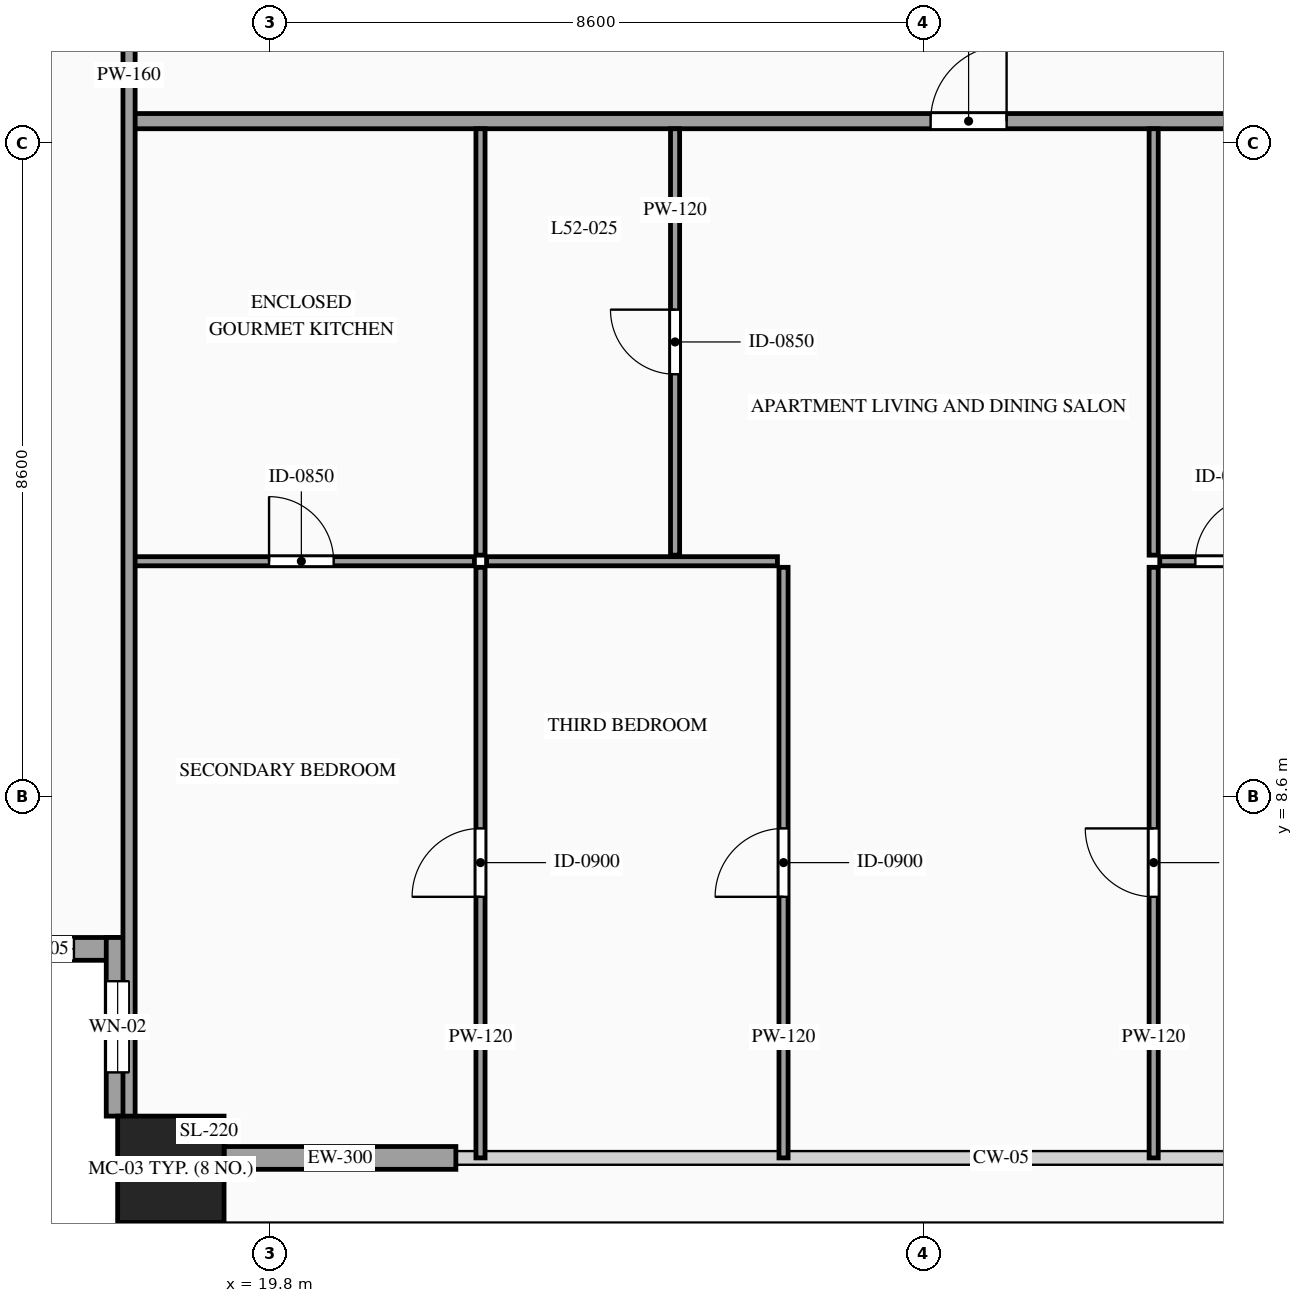
"""IFC4 building model, lengths in metres.
Left out: names, types, materials, properties, quantities, classifications, styles, units other than length and angle.
Written with IfcOpenShell. Run it as: python <this file> out.ifc"""

import sys

from ifc_helpers import new_model, si_unit, direction, frame, frame_2d, origin, origin_2d, place, context, subcontext, project, spatial, rectangle, hollow_rectangle, extrude, source, transform, mapped, element, fill, save


model = new_model("IFC4")
c1 = context("Model", 3, precision=1e-05, world=origin(), true_north=direction((0.0, 1.0)))
c2 = subcontext(c1, "Body", "Model", "MODEL_VIEW")
j1 = project(units=[si_unit("LENGTHUNIT", "METRE"), si_unit("PLANEANGLEUNIT", "RADIAN")], contexts=[c1])
p1 = place(None, origin())
s1 = spatial("IfcSite", under=j1, at=p1, CompositionType="ELEMENT")
p2 = place(p1, origin())
s2 = spatial("IfcBuilding", under=s1, at=p2, CompositionType="ELEMENT")
p3 = place(p2, frame((0.0, 0.0, 198.5)))
s3 = spatial("IfcBuildingStorey", under=s2, at=p3, CompositionType="ELEMENT", Elevation=198.5)
m1 = source(origin(), c2, "Body", "SweptSolid", [
    extrude(hollow_rectangle(XDim=1.4, YDim=1.4, WallThickness=0.06, at=origin_2d()), origin(), (0.0, 0.0, 1.0), 3.5),
])
p4 = place(p3, frame((18.5, 3.7, 0.0), z_axis=(0.0, 0.0, 1.0), x_axis=(1.0, 0.0, 0.0)))
e1 = element("IfcColumn", 1, at=p4, inside=s3, PredefinedType="COLUMN", context=c2, shape_type="MappedRepresentation", body=[
    mapped(m1, transform((0.0, 0.0, 0.0), scale=1.0)),
])
p5 = place(p3, frame((15.6, 6.6, 0.0), z_axis=(0.0, 0.0, 1.0), x_axis=(1.0, 0.0, 0.0)))
e2 = element("IfcWall", 2, at=p5, inside=s3, PredefinedType="SOLIDWALL", context=c2, shape_type="SweptSolid", body=[
    extrude(rectangle(XDim=2.35, YDim=0.3, at=frame_2d((1.175, 0.0))), origin(), (0.0, 0.0, 1.0), 3.28),
])
p6 = place(p5, frame((0.725, 0.0, 0.85)))
e3 = element("IfcOpeningElement", 3, at=p6, cuts=e2, PredefinedType="OPENING", context=c2, shape_type="SweptSolid", body=[
    extrude(rectangle(XDim=0.9, YDim=1.5, at=frame_2d((0.45, 0.75))), frame((0.0, 0.165, 0.0), z_axis=(0.0, -1.0, 0.0), x_axis=(1.0, 0.0, 0.0)), (0.0, 0.0, 1.0), 0.33),
])
p7 = place(p3, frame((17.8, 6.75, 0.0), z_axis=(0.0, 0.0, 1.0), x_axis=(0.0, -1.0, 0.0)))
e4 = element("IfcWall", 4, at=p7, inside=s3, PredefinedType="SOLIDWALL", context=c2, shape_type="SweptSolid", body=[
    extrude(rectangle(XDim=2.35, YDim=0.3, at=frame_2d((1.175, 0.0))), origin(), (0.0, 0.0, 1.0), 3.28),
])
p8 = place(p7, frame((0.575, 0.0, 0.85)))
e5 = element("IfcOpeningElement", 5, at=p8, cuts=e4, PredefinedType="OPENING", context=c2, shape_type="SweptSolid", body=[
    extrude(rectangle(XDim=1.2, YDim=2.1, at=frame_2d((0.6, 1.05))), frame((0.0, 0.165, 0.0), z_axis=(0.0, -1.0, 0.0), x_axis=(1.0, 0.0, 0.0)), (0.0, 0.0, 1.0), 0.33),
])
m2 = source(origin(), c2, "Body", "SweptSolid", [
    extrude(rectangle(XDim=3.05, YDim=0.3, at=frame_2d((1.525, 0.0))), origin(), (0.0, 0.0, 1.0), 2.835),
])
p9 = place(p3, frame((19.2, 3.85, 0.0), z_axis=(0.0, 0.0, 1.0), x_axis=(1.0, 0.0, 0.0)))
e6 = element("IfcWall", 6, at=p9, inside=s3, PredefinedType="SOLIDWALL", context=c2, shape_type="MappedRepresentation", body=[
    mapped(m2, transform((0.0, 0.0, 0.0), scale=1.0)),
])
p10 = place(p3, frame((17.94, 17.49, 0.0), z_axis=(0.0, 0.0, 1.0), x_axis=(1.0, 0.0, 0.0)))
e7 = element("IfcWall", 7, at=p10, inside=s3, PredefinedType="PARTITIONING", context=c2, shape_type="SweptSolid", body=[
    extrude(rectangle(XDim=18.218, YDim=0.2, at=frame_2d((9.109, 0.0))), origin(), (0.0, 0.0, 1.0), 3.28),
])
p11 = place(p10, frame((10.556, 0.0, 0.0)))
e8 = element("IfcOpeningElement", 8, at=p11, cuts=e7, PredefinedType="OPENING", context=c2, shape_type="SweptSolid", body=[
    extrude(rectangle(XDim=1.0, YDim=2.2, at=frame_2d((0.5, 1.1))), frame((0.0, 0.115, 0.0), z_axis=(0.0, -1.0, 0.0), x_axis=(1.0, 0.0, 0.0)), (0.0, 0.0, 1.0), 0.23),
])
p12 = place(p3, frame((17.94, 11.7, 0.0), z_axis=(0.0, 0.0, 1.0), x_axis=(1.0, 0.0, 0.0)))
e9 = element("IfcWall", 9, at=p12, inside=s3, PredefinedType="PARTITIONING", context=c2, shape_type="SweptSolid", body=[
    extrude(rectangle(XDim=4.554, YDim=0.12, at=frame_2d((2.277, 0.0))), origin(), (0.0, 0.0, 1.0), 3.28),
])
p13 = place(p12, frame((1.852, 0.0, 0.0)))
e10 = element("IfcOpeningElement", 10, at=p13, cuts=e9, PredefinedType="OPENING", context=c2, shape_type="SweptSolid", body=[
    extrude(rectangle(XDim=0.85, YDim=2.1, at=frame_2d((0.425, 1.05))), frame((0.0, 0.075, 0.0), z_axis=(0.0, -1.0, 0.0), x_axis=(1.0, 0.0, 0.0)), (0.0, 0.0, 1.0), 0.15),
])
m3 = source(origin(), c2, "Body", "SweptSolid", [
    extrude(rectangle(XDim=5.61, YDim=0.12, at=frame_2d((2.805, 0.0))), origin(), (0.0, 0.0, 1.0), 3.28),
])
p14 = place(p3, frame((22.574, 11.78, 0.0), z_axis=(0.0, 0.0, 1.0), x_axis=(0.0, 1.0, 0.0)))
e11 = element("IfcWall", 11, at=p14, inside=s3, PredefinedType="PARTITIONING", context=c2, shape_type="MappedRepresentation", body=[
    mapped(m3, transform((0.0, 0.0, 0.0), scale=1.0)),
])
p15 = place(p3, frame((25.134, 11.78, 0.0), z_axis=(0.0, 0.0, 1.0), x_axis=(0.0, 1.0, 0.0)))
e12 = element("IfcWall", 12, at=p15, inside=s3, PredefinedType="PARTITIONING", context=c2, shape_type="SweptSolid", body=[
    extrude(rectangle(XDim=5.61, YDim=0.12, at=frame_2d((2.805, 0.0))), origin(), (0.0, 0.0, 1.0), 3.28),
])
p16 = place(p15, frame((2.38, 0.0, 0.0)))
e13 = element("IfcOpeningElement", 13, at=p16, cuts=e12, PredefinedType="OPENING", context=c2, shape_type="SweptSolid", body=[
    extrude(rectangle(XDim=0.85, YDim=2.1, at=frame_2d((0.425, 1.05))), frame((0.0, 0.075, 0.0), z_axis=(0.0, -1.0, 0.0), x_axis=(1.0, 0.0, 0.0)), (0.0, 0.0, 1.0), 0.15),
])
p17 = place(p3, frame((31.431, 11.78, 0.0), z_axis=(0.0, 0.0, 1.0), x_axis=(0.0, 1.0, 0.0)))
e14 = element("IfcWall", 14, at=p17, inside=s3, PredefinedType="PARTITIONING", context=c2, shape_type="MappedRepresentation", body=[
    mapped(m3, transform((0.0, 0.0, 0.0), scale=1.0)),
])
p18 = place(p3, frame((22.574, 3.85, 0.0), z_axis=(0.0, 0.0, 1.0), x_axis=(0.0, 1.0, 0.0)))
e15 = element("IfcWall", 15, at=p18, inside=s3, PredefinedType="PARTITIONING", context=c2, shape_type="SweptSolid", body=[
    extrude(rectangle(XDim=7.77, YDim=0.12, at=frame_2d((3.885, 0.0))), origin(), (0.0, 0.0, 1.0), 3.28),
])
p19 = place(p18, frame((3.435, 0.0, 0.0)))
e16 = element("IfcOpeningElement", 16, at=p19, cuts=e15, PredefinedType="OPENING", context=c2, shape_type="SweptSolid", body=[
    extrude(rectangle(XDim=0.9, YDim=2.15, at=frame_2d((0.45, 1.075))), frame((0.0, 0.075, 0.0), z_axis=(0.0, -1.0, 0.0), x_axis=(1.0, 0.0, 0.0)), (0.0, 0.0, 1.0), 0.15),
])
p20 = place(p3, frame((31.511, 11.7, 0.0), z_axis=(0.0, 0.0, 1.0), x_axis=(1.0, 0.0, 0.0)))
e17 = element("IfcWall", 17, at=p20, inside=s3, PredefinedType="PARTITIONING", context=c2, shape_type="SweptSolid", body=[
    extrude(rectangle(XDim=4.647, YDim=0.12, at=frame_2d((2.323, 0.0))), origin(), (0.0, 0.0, 1.0), 2.875),
])
p21 = place(p20, frame((2.872, 0.0, 0.0)))
e18 = element("IfcOpeningElement", 18, at=p21, cuts=e17, PredefinedType="OPENING", context=c2, shape_type="SweptSolid", body=[
    extrude(rectangle(XDim=0.85, YDim=2.1, at=frame_2d((0.425, 1.05))), frame((0.0, 0.075, 0.0), z_axis=(0.0, -1.0, 0.0), x_axis=(1.0, 0.0, 0.0)), (0.0, 0.0, 1.0), 0.15),
])
p22 = place(p20, frame((0.469, 0.0, 0.0)))
e19 = element("IfcOpeningElement", 19, at=p22, cuts=e17, PredefinedType="OPENING", context=c2, shape_type="SweptSolid", body=[
    extrude(rectangle(XDim=0.85, YDim=2.1, at=frame_2d((0.425, 1.05))), frame((0.0, 0.075, 0.0), z_axis=(0.0, -1.0, 0.0), x_axis=(1.0, 0.0, 0.0)), (0.0, 0.0, 1.0), 0.15),
])
p23 = place(p3, frame((31.431, 3.85, 0.0), z_axis=(0.0, 0.0, 1.0), x_axis=(0.0, 1.0, 0.0)))
e20 = element("IfcWall", 20, at=p23, inside=s3, PredefinedType="PARTITIONING", context=c2, shape_type="SweptSolid", body=[
    extrude(rectangle(XDim=7.77, YDim=0.12, at=frame_2d((3.885, 0.0))), origin(), (0.0, 0.0, 1.0), 3.28),
])
p24 = place(p23, frame((3.435, 0.0, 0.0)))
e21 = element("IfcOpeningElement", 21, at=p24, cuts=e20, PredefinedType="OPENING", context=c2, shape_type="SweptSolid", body=[
    extrude(rectangle(XDim=0.9, YDim=2.15, at=frame_2d((0.45, 1.075))), frame((0.0, 0.075, 0.0), z_axis=(0.0, -1.0, 0.0), x_axis=(1.0, 0.0, 0.0)), (0.0, 0.0, 1.0), 0.15),
])
m4 = source(origin(), c2, "Body", "SweptSolid", [
    extrude(rectangle(XDim=3.827, YDim=0.12, at=frame_2d((1.914, 0.0))), origin(), (0.0, 0.0, 1.0), 2.875),
])
p25 = place(p3, frame((22.654, 11.7, 0.0), z_axis=(0.0, 0.0, 1.0), x_axis=(1.0, 0.0, 0.0)))
e22 = element("IfcWall", 22, at=p25, inside=s3, PredefinedType="PARTITIONING", context=c2, shape_type="MappedRepresentation", body=[
    mapped(m4, transform((0.0, 0.0, 0.0), scale=1.0)),
])
p26 = place(p3, frame((26.561, 3.85, 0.0), z_axis=(0.0, 0.0, 1.0), x_axis=(0.0, 1.0, 0.0)))
e23 = element("IfcWall", 23, at=p26, inside=s3, PredefinedType="PARTITIONING", context=c2, shape_type="SweptSolid", body=[
    extrude(rectangle(XDim=7.77, YDim=0.12, at=frame_2d((3.885, 0.0))), origin(), (0.0, 0.0, 1.0), 3.28),
])
p27 = place(p26, frame((3.435, 0.0, 0.0)))
e24 = element("IfcOpeningElement", 24, at=p27, cuts=e23, PredefinedType="OPENING", context=c2, shape_type="SweptSolid", body=[
    extrude(rectangle(XDim=0.9, YDim=2.15, at=frame_2d((0.45, 1.075))), frame((0.0, 0.075, 0.0), z_axis=(0.0, -1.0, 0.0), x_axis=(1.0, 0.0, 0.0)), (0.0, 0.0, 1.0), 0.15),
])
m5 = source(origin(), c2, "Body", "SweptSolid", [
    extrude(rectangle(XDim=28.19, YDim=0.16, at=frame_2d((14.095, 0.0))), origin(), (0.0, 0.0, 1.0), 3.28),
])
p28 = place(p3, frame((17.95, 4.0, 0.0), z_axis=(0.0, 0.0, 1.0), x_axis=(0.0, 1.0, 0.0)))
e25 = element("IfcWall", 25, at=p28, inside=s3, PredefinedType="PARTITIONING", context=c2, shape_type="MappedRepresentation", body=[
    mapped(m5, transform((0.0, 0.0, 0.0), scale=1.0)),
])
m6 = source(origin(), c2, "Body", "SweptSolid", [
    extrude(rectangle(XDim=0.9, YDim=1.5, at=frame_2d((0.45, 0.75))), frame((0.0, 0.03, 0.0), z_axis=(0.0, -1.0, 0.0), x_axis=(1.0, 0.0, 0.0)), (0.0, 0.0, 1.0), 0.06),
])
p29 = place(p6, origin())
e26 = element("IfcWindow", 26, at=p29, inside=s3, PartitioningType="SINGLE_PANEL", PredefinedType="WINDOW", context=c2, shape_type="MappedRepresentation", body=[
    mapped(m6, transform((0.0, 0.0, 0.0), scale=1.0)),
])
fill(e3, e26)
m7 = source(origin(), c2, "Body", "SweptSolid", [
    extrude(rectangle(XDim=1.2, YDim=2.1, at=frame_2d((0.6, 1.05))), frame((0.0, 0.03, 0.0), z_axis=(0.0, -1.0, 0.0), x_axis=(1.0, 0.0, 0.0)), (0.0, 0.0, 1.0), 0.06),
])
p30 = place(p8, origin())
e27 = element("IfcWindow", 27, at=p30, inside=s3, PartitioningType="SINGLE_PANEL", PredefinedType="WINDOW", context=c2, shape_type="MappedRepresentation", body=[
    mapped(m7, transform((0.0, 0.0, 0.0), scale=1.0)),
])
fill(e5, e27)
m8 = source(origin(), c2, "Body", "SweptSolid", [
    extrude(rectangle(XDim=1.0, YDim=2.2, at=frame_2d((0.5, 1.1))), frame((0.0, 0.025, 0.0), z_axis=(0.0, -1.0, 0.0), x_axis=(1.0, 0.0, 0.0)), (0.0, 0.0, 1.0), 0.05),
])
p31 = place(p11, origin())
e28 = element("IfcDoor", 28, at=p31, inside=s3, OperationType="SINGLE_SWING_RIGHT", PredefinedType="DOOR", context=c2, shape_type="MappedRepresentation", body=[
    mapped(m8, transform((0.0, 0.0, 0.0), scale=1.0)),
])
fill(e8, e28)
m9 = source(origin(), c2, "Body", "SweptSolid", [
    extrude(rectangle(XDim=0.85, YDim=2.1, at=frame_2d((0.425, 1.05))), frame((0.0, 0.025, 0.0), z_axis=(0.0, -1.0, 0.0), x_axis=(1.0, 0.0, 0.0)), (0.0, 0.0, 1.0), 0.05),
])
p32 = place(p13, origin())
e29 = element("IfcDoor", 29, at=p32, inside=s3, OperationType="SINGLE_SWING_LEFT", PredefinedType="DOOR", context=c2, shape_type="MappedRepresentation", body=[
    mapped(m9, transform((0.0, 0.0, 0.0), scale=1.0)),
])
fill(e10, e29)
p33 = place(p16, origin())
e30 = element("IfcDoor", 30, at=p33, inside=s3, OperationType="SINGLE_SWING_RIGHT", PredefinedType="DOOR", context=c2, shape_type="MappedRepresentation", body=[
    mapped(m9, transform((0.0, 0.0, 0.0), scale=1.0)),
])
fill(e13, e30)
p34 = place(p22, origin())
e31 = element("IfcDoor", 31, at=p34, inside=s3, OperationType="SINGLE_SWING_RIGHT", PredefinedType="DOOR", context=c2, shape_type="MappedRepresentation", body=[
    mapped(m9, transform((0.0, 0.0, 0.0), scale=1.0)),
])
fill(e19, e31)
m10 = source(origin(), c2, "Body", "SweptSolid", [
    extrude(rectangle(XDim=0.9, YDim=2.15, at=frame_2d((0.45, 1.075))), frame((0.0, 0.025, 0.0), z_axis=(0.0, -1.0, 0.0), x_axis=(1.0, 0.0, 0.0)), (0.0, 0.0, 1.0), 0.05),
])
p35 = place(p19, origin())
e32 = element("IfcDoor", 32, at=p35, inside=s3, OperationType="SINGLE_SWING_LEFT", PredefinedType="DOOR", context=c2, shape_type="MappedRepresentation", body=[
    mapped(m10, transform((0.0, 0.0, 0.0), scale=1.0)),
])
fill(e16, e32)
p36 = place(p24, origin())
e33 = element("IfcDoor", 33, at=p36, inside=s3, OperationType="SINGLE_SWING_RIGHT", PredefinedType="DOOR", context=c2, shape_type="MappedRepresentation", body=[
    mapped(m10, transform((0.0, 0.0, 0.0), scale=1.0)),
])
fill(e21, e33)
p37 = place(p27, origin())
e34 = element("IfcDoor", 34, at=p37, inside=s3, OperationType="SINGLE_SWING_LEFT", PredefinedType="DOOR", context=c2, shape_type="MappedRepresentation", body=[
    mapped(m10, transform((0.0, 0.0, 0.0), scale=1.0)),
])
fill(e24, e34)
save(model, sys.argv[1])
